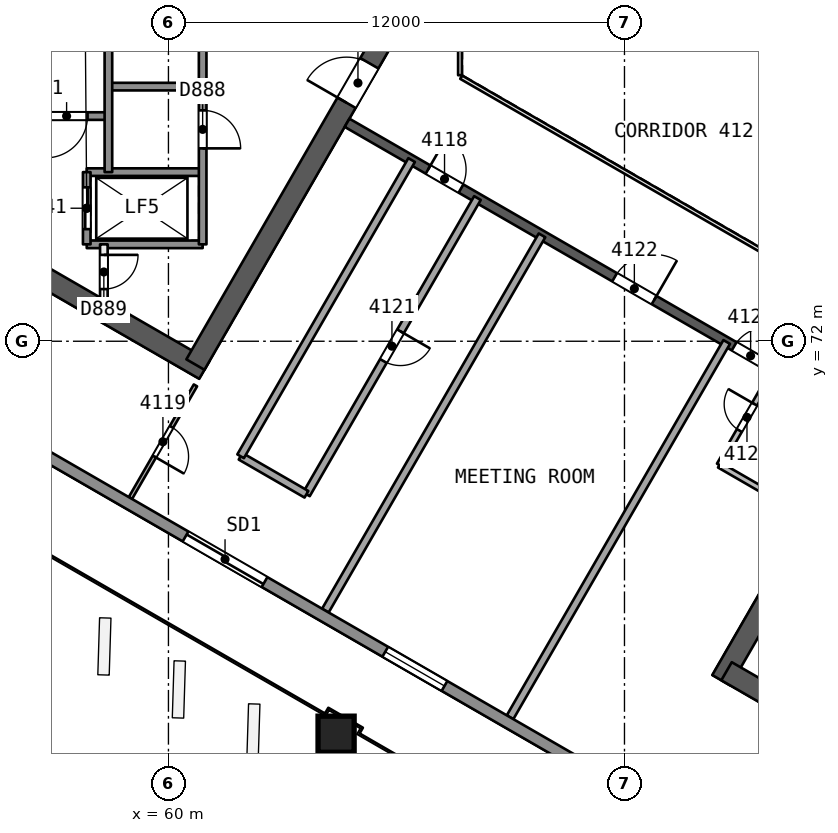
"""IFC4 building model, lengths in metres.
Left out: names, types, materials, properties, quantities, classifications, styles, units other than length and angle.
Written with IfcOpenShell. Run it as: python <this file> out.ifc"""

import sys

from ifc_helpers import new_model, si_unit, direction, frame, frame_2d, origin, origin_2d, place, context, subcontext, project, spatial, rectangle, extrude, element, fill, save


model = new_model("IFC4")
c1 = context("Model", 3, precision=1e-05, world=origin(), true_north=direction((0.0, 1.0)))
c2 = subcontext(c1, "Body", "Model", "MODEL_VIEW")
j1 = project(units=[si_unit("LENGTHUNIT", "METRE"), si_unit("PLANEANGLEUNIT", "RADIAN")], contexts=[c1])
p1 = place(None, origin())
s1 = spatial("IfcSite", under=j1, at=p1, CompositionType="ELEMENT")
p2 = place(p1, origin())
s2 = spatial("IfcBuilding", under=s1, at=p2, CompositionType="ELEMENT")
p3 = place(p2, frame((0.0, 0.0, 171.1)))
s3 = spatial("IfcBuildingStorey", under=s2, at=p3, CompositionType="ELEMENT", Elevation=171.1)
p4 = place(p3, frame((48.672, 78.336, 0.0), z_axis=(0.0, 0.0, 1.0), x_axis=(0.866023530946, -0.500003243837, 0.0)))
e1 = element("IfcWall", 1, at=p4, inside=s3, PredefinedType="SHEAR", context=c2, shape_type="SweptSolid", body=[
    extrude(rectangle(XDim=14.175, YDim=0.55, at=frame_2d((7.087, 0.0))), origin(), (0.0, 0.0, 1.0), 3.7),
])
p5 = place(p3, frame((60.709, 71.386, 0.0), z_axis=(0.0, 0.0, 1.0), x_axis=(0.500015938302, 0.866016201606, 0.0)))
e2 = element("IfcWall", 2, at=p5, inside=s3, PredefinedType="SHEAR", context=c2, shape_type="SweptSolid", body=[
    extrude(rectangle(XDim=10.105, YDim=0.55, at=frame_2d((5.053, 0.0))), origin(), (0.0, 0.0, 1.0), 3.7),
])
p6 = place(p5, frame((7.955, 0.0, 0.0)))
e3 = element("IfcOpeningElement", 3, at=p6, cuts=e2, PredefinedType="OPENING", context=c2, shape_type="SweptSolid", body=[
    extrude(rectangle(XDim=1.2, YDim=2.1, at=frame_2d((0.6, 1.05))), frame((0.0, 0.286, 0.0), z_axis=(0.0, -1.0, 0.0), x_axis=(1.0, 0.0, 0.0)), (0.0, 0.0, 1.0), 0.571),
])
p7 = place(p3, frame((79.659, 71.931, 0.0), z_axis=(0.0, 0.0, 1.0), x_axis=(-0.500000202252, -0.866025287014, 0.0)))
e4 = element("IfcWall", 4, at=p7, inside=s3, PredefinedType="SHEAR", context=c2, shape_type="SweptSolid", body=[
    extrude(rectangle(XDim=10.221, YDim=0.55, at=frame_2d((5.111, 0.0))), origin(), (0.0, 0.0, 1.0), 3.7),
])
p8 = place(p7, frame((0.791, 0.0, 0.0)))
e5 = element("IfcOpeningElement", 5, at=p8, cuts=e4, PredefinedType="OPENING", context=c2, shape_type="SweptSolid", body=[
    extrude(rectangle(XDim=1.2, YDim=2.1, at=frame_2d((0.6, 1.05))), frame((0.0, 0.286, 0.0), z_axis=(0.0, -1.0, 0.0), x_axis=(1.0, 0.0, 0.0)), (0.0, 0.0, 1.0), 0.571),
])
p9 = place(p3, frame((74.686, 63.317, 0.0), z_axis=(0.0, 0.0, 1.0), x_axis=(0.866024505738, -0.500001555459, 0.0)))
e6 = element("IfcWall", 6, at=p9, inside=s3, PredefinedType="SHEAR", context=c2, shape_type="SweptSolid", body=[
    extrude(rectangle(XDim=14.059, YDim=0.55, at=frame_2d((7.029, 0.0))), origin(), (0.0, 0.0, 1.0), 3.7),
])
p10 = place(p3, frame((64.7, 77.748, 0.0), z_axis=(0.0, 0.0, 1.0), x_axis=(0.866026492143, -0.499998114903, 0.0)))
e7 = element("IfcWall", 7, at=p10, inside=s3, PredefinedType="SHEAR", context=c2, shape_type="SweptSolid", body=[
    extrude(rectangle(XDim=15.588, YDim=0.25, at=frame_2d((7.794, 0.0))), origin(), (0.0, 0.0, 1.0), 3.25),
])
p11 = place(p10, frame((2.462, 0.0, 0.0)))
e8 = element("IfcOpeningElement", 8, at=p11, cuts=e7, PredefinedType="OPENING", context=c2, shape_type="SweptSolid", body=[
    extrude(rectangle(XDim=1.0, YDim=2.1, at=frame_2d((0.5, 1.05))), frame((0.0, 0.135, 0.0), z_axis=(0.0, -1.0, 0.0), x_axis=(1.0, 0.0, 0.0)), (0.0, 0.0, 1.0), 0.271),
])
p12 = place(p10, frame((8.129, 0.0, 0.0)))
e9 = element("IfcOpeningElement", 9, at=p12, cuts=e7, PredefinedType="OPENING", context=c2, shape_type="SweptSolid", body=[
    extrude(rectangle(XDim=1.2, YDim=2.4, at=frame_2d((0.6, 1.2))), frame((0.0, 0.135, 0.0), z_axis=(0.0, -1.0, 0.0), x_axis=(1.0, 0.0, 0.0)), (0.0, 0.0, 1.0), 0.271),
])
p13 = place(p10, frame((11.762, 0.0, 0.0)))
e10 = element("IfcOpeningElement", 10, at=p13, cuts=e7, PredefinedType="OPENING", context=c2, shape_type="SweptSolid", body=[
    extrude(rectangle(XDim=1.0, YDim=2.1, at=frame_2d((0.5, 1.05))), frame((0.0, 0.135, 0.0), z_axis=(0.0, -1.0, 0.0), x_axis=(1.0, 0.0, 0.0)), (0.0, 0.0, 1.0), 0.271),
])
p14 = place(p3, frame((64.399, 61.639, 0.0), z_axis=(0.010093620709, 0.017482414954, 0.999796221231), x_axis=(-0.499907122366, -0.865843723195, 0.020187025824)))
e11 = element("IfcColumn", 11, at=p14, inside=s3, PredefinedType="COLUMN", context=c2, shape_type="SweptSolid", body=[
    extrude(rectangle(XDim=0.95, YDim=0.95, at=origin_2d()), origin(), (0.0, 0.0, 1.0), 3.701),
])
p15 = place(p3, frame((60.71, 70.838, 0.0), z_axis=(0.0, 0.0, 1.0), x_axis=(-0.499981725576, -0.866035954271, 0.0)))
e12 = element("IfcWall", 12, at=p15, inside=s3, PredefinedType="PARTITIONING", context=c2, shape_type="SweptSolid", body=[
    extrude(rectangle(XDim=3.424, YDim=0.1, at=frame_2d((1.712, 0.0))), origin(), (0.0, 0.0, 1.0), 3.25),
])
p16 = place(p15, frame((1.262, 0.0, 0.0)))
e13 = element("IfcOpeningElement", 13, at=p16, cuts=e12, PredefinedType="OPENING", context=c2, shape_type="SweptSolid", body=[
    extrude(rectangle(XDim=0.9, YDim=2.1, at=frame_2d((0.45, 1.05))), frame((0.0, 0.061, 0.0), z_axis=(0.0, -1.0, 0.0), x_axis=(1.0, 0.0, 0.0)), (0.0, 0.0, 1.0), 0.121),
])
p17 = place(p3, frame((68.131, 75.767, 0.0), z_axis=(0.0, 0.0, 1.0), x_axis=(-0.5000018851, -0.866024315419, 0.0)))
e14 = element("IfcWall", 14, at=p17, inside=s3, PredefinedType="PARTITIONING", context=c2, shape_type="SweptSolid", body=[
    extrude(rectangle(XDim=9.0, YDim=0.2, at=frame_2d((4.5, 0.0))), origin(), (0.0, 0.0, 1.0), 3.25),
])
p18 = place(p17, frame((4.05, 0.0, 0.0)))
e15 = element("IfcOpeningElement", 15, at=p18, cuts=e14, PredefinedType="OPENING", context=c2, shape_type="SweptSolid", body=[
    extrude(rectangle(XDim=0.9, YDim=2.1, at=frame_2d((0.45, 1.05))), frame((0.0, 0.11, 0.0), z_axis=(0.0, -1.0, 0.0), x_axis=(1.0, 0.0, 0.0)), (0.0, 0.0, 1.0), 0.221),
])
p19 = place(p3, frame((63.631, 67.973, 0.0), z_axis=(0.0, 0.0, 1.0), x_axis=(-0.866041268327, 0.499972520799, 0.0)))
e16 = element("IfcWall", 16, at=p19, inside=s3, PredefinedType="PARTITIONING", context=c2, shape_type="SweptSolid", body=[
    extrude(rectangle(XDim=2.0, YDim=0.2, at=frame_2d((1.0, 0.0))), origin(), (0.0, 0.0, 1.0), 3.25),
])
p20 = place(p3, frame((61.899, 68.973, 0.0), z_axis=(0.0, 0.0, 1.0), x_axis=(0.5000018851, 0.866024315419, 0.0)))
e17 = element("IfcWall", 17, at=p20, inside=s3, PredefinedType="PARTITIONING", context=c2, shape_type="SweptSolid", body=[
    extrude(rectangle(XDim=9.0, YDim=0.2, at=frame_2d((4.5, 0.0))), origin(), (0.0, 0.0, 1.0), 3.25),
])
for number, where, z_axis, x_axis in (
    (18, (64.129, 64.912, 0.0), (0.0, 0.0, 1.0), (0.5, 0.866, 0.0)),
    (19, (68.989, 62.106, 0.0), (0.0, 0.0, 1.0), (0.5, 0.866, 0.0)),
):
    element("IfcWall", number, at=place(p3, frame(where, z_axis=z_axis, x_axis=x_axis)), inside=s3, PredefinedType="PARTITIONING", context=c2, shape_type="SweptSolid", body=[
        extrude(rectangle(XDim=11.402, YDim=0.2, at=frame_2d((5.701, 0.0))), origin(), (0.0, 0.0, 1.0), 3.25),
    ])
p21 = place(p3, frame((76.578, 67.542, 0.0), z_axis=(0.0, 0.0, 1.0), x_axis=(-0.866038271014, 0.499977712642, 0.0)))
e20 = element("IfcWall", 20, at=p21, inside=s3, PredefinedType="PARTITIONING", context=c2, shape_type="SweptSolid", body=[
    extrude(rectangle(XDim=2.401, YDim=0.15, at=frame_2d((1.2, 0.0))), origin(), (0.0, 0.0, 1.0), 3.25),
])
p22 = place(p3, frame((74.498, 68.743, 0.0), z_axis=(0.0, 0.0, 1.0), x_axis=(0.499987231761, 0.866032775405, 0.0)))
e21 = element("IfcWall", 21, at=p22, inside=s3, PredefinedType="PARTITIONING", context=c2, shape_type="SweptSolid", body=[
    extrude(rectangle(XDim=2.9, YDim=0.15, at=frame_2d((1.45, 0.0))), origin(), (0.0, 0.0, 1.0), 3.25),
])
p23 = place(p22, frame((1.05, 0.0, 0.0)))
e22 = element("IfcOpeningElement", 22, at=p23, cuts=e21, PredefinedType="OPENING", context=c2, shape_type="SweptSolid", body=[
    extrude(rectangle(XDim=0.8, YDim=2.1, at=frame_2d((0.4, 1.05))), frame((0.0, 0.085, 0.0), z_axis=(0.0, -1.0, 0.0), x_axis=(1.0, 0.0, 0.0)), (0.0, 0.0, 1.0), 0.171),
])
p24 = place(p3, frame((88.899, 50.439, 0.0), z_axis=(0.0, 0.0, 1.0), x_axis=(-0.866024128163, 0.500002209434, 0.0)))
e23 = element("IfcWall", 23, at=p24, inside=s3, PredefinedType="SOLIDWALL", context=c2, shape_type="SweptSolid", body=[
    extrude(rectangle(XDim=53.635, YDim=0.3, at=frame_2d((26.817, 0.0))), origin(), (0.0, 0.0, 1.0), 3.25),
])
p25 = place(p24, frame((30.45, 0.0, 0.0)))
e24 = element("IfcOpeningElement", 24, at=p25, cuts=e23, PredefinedType="OPENING", context=c2, shape_type="SweptSolid", body=[
    extrude(rectangle(XDim=2.4, YDim=2.4, at=frame_2d((1.2, 1.2))), frame((0.0, 0.161, 0.0), z_axis=(0.0, -1.0, 0.0), x_axis=(1.0, 0.0, 0.0)), (0.0, 0.0, 1.0), 0.321),
])
p26 = place(p24, frame((41.683, 0.0, 0.0)))
e25 = element("IfcOpeningElement", 25, at=p26, cuts=e23, PredefinedType="OPENING", context=c2, shape_type="SweptSolid", body=[
    extrude(rectangle(XDim=2.4, YDim=2.4, at=frame_2d((1.2, 1.2))), frame((0.0, 0.161, 0.0), z_axis=(0.0, -1.0, 0.0), x_axis=(1.0, 0.0, 0.0)), (0.0, 0.0, 1.0), 0.321),
])
p27 = place(p24, frame((10.295, 0.0, 0.0)))
e26 = element("IfcOpeningElement", 26, at=p27, cuts=e23, PredefinedType="OPENING", context=c2, shape_type="SweptSolid", body=[
    extrude(rectangle(XDim=2.4, YDim=2.4, at=frame_2d((1.2, 1.2))), frame((0.0, 0.161, 0.0), z_axis=(0.0, -1.0, 0.0), x_axis=(1.0, 0.0, 0.0)), (0.0, 0.0, 1.0), 0.321),
])
p28 = place(p24, frame((24.982, 0.0, 0.9)))
e27 = element("IfcOpeningElement", 27, at=p28, cuts=e23, PredefinedType="OPENING", context=c2, shape_type="SweptSolid", body=[
    extrude(rectangle(XDim=1.8, YDim=1.5, at=frame_2d((0.9, 0.75))), frame((0.0, 0.161, 0.0), z_axis=(0.0, -1.0, 0.0), x_axis=(1.0, 0.0, 0.0)), (0.0, 0.0, 1.0), 0.321),
])
p29 = place(p3, frame((60.9, 78.7, 0.0), z_axis=(0.0, 0.0, 1.0), x_axis=(-1.0, 0.0, 0.0)))
e28 = element("IfcWall", 28, at=p29, inside=s3, PredefinedType="SOLIDWALL", context=c2, shape_type="SweptSolid", body=[
    extrude(rectangle(XDim=2.48, YDim=0.2, at=frame_2d((1.24, 0.0))), origin(), (0.0, 0.0, 1.0), 3.25),
])
p30 = place(p3, frame((58.42, 77.925, 0.0), z_axis=(0.0, 0.0, 1.0), x_axis=(-1.0, 0.0, 0.0)))
e29 = element("IfcWall", 29, at=p30, inside=s3, PredefinedType="SOLIDWALL", context=c2, shape_type="SweptSolid", body=[
    extrude(rectangle(XDim=7.7, YDim=0.2, at=frame_2d((3.85, 0.0))), origin(), (0.0, 0.0, 1.0), 3.25),
])
p31 = place(p30, frame((0.55, 0.0, 0.0)))
e30 = element("IfcOpeningElement", 30, at=p31, cuts=e29, PredefinedType="OPENING", context=c2, shape_type="SweptSolid", body=[
    extrude(rectangle(XDim=1.1, YDim=2.1, at=frame_2d((0.55, 1.05))), frame((0.0, 0.11, 0.0), z_axis=(0.0, -1.0, 0.0), x_axis=(1.0, 0.0, 0.0)), (0.0, 0.0, 1.0), 0.221),
])
for number, where, z_axis, x_axis in (
    (31, (60.9, 76.45, 0.0), (0.0, 0.0, 1.0), (-1.0, 0.0, 0.0)),
    (32, (60.9, 74.55, 0.0), (0.0, 0.0, 1.0), (-1.0, 0.0, 0.0)),
):
    element("IfcWall", number, at=place(p3, frame(where, z_axis=z_axis, x_axis=x_axis)), inside=s3, PredefinedType="SOLIDWALL", context=c2, shape_type="SweptSolid", body=[
        extrude(rectangle(XDim=3.05, YDim=0.2, at=frame_2d((1.525, 0.0))), origin(), (0.0, 0.0, 1.0), 3.25),
    ])
p32 = place(p3, frame((60.9, 85.45, 0.0), z_axis=(0.0, 0.0, 1.0), x_axis=(0.0, -1.0, 0.0)))
e33 = element("IfcWall", 33, at=p32, inside=s3, PredefinedType="SOLIDWALL", context=c2, shape_type="SweptSolid", body=[
    extrude(rectangle(XDim=10.9, YDim=0.2, at=frame_2d((5.45, 0.0))), origin(), (0.0, 0.0, 1.0), 3.25),
])
p33 = place(p32, frame((2.875, 0.0, 0.0)))
e34 = element("IfcOpeningElement", 34, at=p33, cuts=e33, PredefinedType="OPENING", context=c2, shape_type="SweptSolid", body=[
    extrude(rectangle(XDim=1.0, YDim=2.1, at=frame_2d((0.5, 1.05))), frame((0.0, 0.11, 0.0), z_axis=(0.0, -1.0, 0.0), x_axis=(1.0, 0.0, 0.0)), (0.0, 0.0, 1.0), 0.221),
])
p34 = place(p32, frame((7.375, 0.0, 0.0)))
e35 = element("IfcOpeningElement", 35, at=p34, cuts=e33, PredefinedType="OPENING", context=c2, shape_type="SweptSolid", body=[
    extrude(rectangle(XDim=1.0, YDim=2.1, at=frame_2d((0.5, 1.05))), frame((0.0, 0.11, 0.0), z_axis=(0.0, -1.0, 0.0), x_axis=(1.0, 0.0, 0.0)), (0.0, 0.0, 1.0), 0.221),
])
p35 = place(p3, frame((58.42, 86.974, 0.0), z_axis=(0.0, 0.0, 1.0), x_axis=(0.0, -1.0, 0.0)))
e36 = element("IfcWall", 36, at=p35, inside=s3, PredefinedType="SOLIDWALL", context=c2, shape_type="SweptSolid", body=[
    extrude(rectangle(XDim=10.524, YDim=0.2, at=frame_2d((5.262, 0.0))), origin(), (0.0, 0.0, 1.0), 3.25),
])
p36 = place(p35, frame((0.312, 0.0, 0.0)))
e37 = element("IfcOpeningElement", 37, at=p36, cuts=e36, PredefinedType="OPENING", context=c2, shape_type="SweptSolid", body=[
    extrude(rectangle(XDim=0.9, YDim=2.1, at=frame_2d((0.45, 1.05))), frame((0.0, 0.11, 0.0), z_axis=(0.0, -1.0, 0.0), x_axis=(1.0, 0.0, 0.0)), (0.0, 0.0, 1.0), 0.221),
])
p37 = place(p3, frame((58.3, 74.55, 0.0), z_axis=(0.0, 0.0, 1.0), x_axis=(0.0, -1.0, 0.0)))
e38 = element("IfcWall", 38, at=p37, inside=s3, PredefinedType="PARTITIONING", context=c2, shape_type="SweptSolid", body=[
    extrude(rectangle(XDim=1.455, YDim=0.2, at=frame_2d((0.728, 0.0))), origin(), (0.0, 0.0, 1.0), 3.25),
])
p38 = place(p37, frame((0.278, 0.0, 0.0)))
e39 = element("IfcOpeningElement", 39, at=p38, cuts=e38, PredefinedType="OPENING", context=c2, shape_type="SweptSolid", body=[
    extrude(rectangle(XDim=0.9, YDim=2.1, at=frame_2d((0.45, 1.05))), frame((0.0, 0.11, 0.0), z_axis=(0.0, -1.0, 0.0), x_axis=(1.0, 0.0, 0.0)), (0.0, 0.0, 1.0), 0.221),
])
p39 = place(p3, frame((57.85, 76.45, 0.0), z_axis=(0.0, 0.0, 1.0), x_axis=(0.0, -1.0, 0.0)))
e40 = element("IfcWall", 40, at=p39, inside=s3, PredefinedType="SOLIDWALL", context=c2, shape_type="SweptSolid", body=[
    extrude(rectangle(XDim=1.9, YDim=0.2, at=frame_2d((0.95, 0.0))), origin(), (0.0, 0.0, 1.0), 3.25),
])
p40 = place(p39, frame((0.4, 0.0, 0.0)))
e41 = element("IfcOpeningElement", 41, at=p40, cuts=e40, PredefinedType="OPENING", context=c2, shape_type="SweptSolid", body=[
    extrude(rectangle(XDim=1.1, YDim=2.1, at=frame_2d((0.55, 1.05))), frame((0.0, 0.11, 0.0), z_axis=(0.0, -1.0, 0.0), x_axis=(1.0, 0.0, 0.0)), (0.0, 0.0, 1.0), 0.221),
])
p41 = place(p3, frame((67.672, 81.0, 0.0), z_axis=(0.0, 0.0, 1.0), x_axis=(0.0, -1.0, 0.0)))
e42 = element("IfcWall", 42, at=p41, inside=s3, PredefinedType="PARTITIONING", context=c2, shape_type="SweptSolid", body=[
    extrude(rectangle(XDim=2.0, YDim=0.1, at=frame_2d((1.0, 0.0))), origin(), (0.0, 0.0, 1.0), 3.25),
])
p42 = place(p3, frame((67.702, 78.948, 0.0), z_axis=(0.0, 0.0, 1.0), x_axis=(0.866026658274, -0.499997827154, 0.0)))
e43 = element("IfcWall", 43, at=p42, inside=s3, PredefinedType="PARTITIONING", context=c2, shape_type="SweptSolid", body=[
    extrude(rectangle(XDim=11.588, YDim=0.1, at=frame_2d((5.794, 0.0))), origin(), (0.0, 0.0, 1.0), 3.25),
])
p43 = place(p11, origin())
e44 = element("IfcDoor", 44, at=p43, inside=s3, OperationType="SINGLE_SWING_LEFT", PredefinedType="NOTDEFINED", context=c2, shape_type="SweptSolid", body=[
    extrude(rectangle(XDim=1.0, YDim=2.1, at=frame_2d((0.5, 1.05))), frame((0.0, 0.025, 0.0), z_axis=(0.0, -1.0, 0.0), x_axis=(1.0, 0.0, 0.0)), (0.0, 0.0, 1.0), 0.05),
])
fill(e8, e44)
p44 = place(p16, origin())
e45 = element("IfcDoor", 45, at=p44, inside=s3, OperationType="SINGLE_SWING_RIGHT", PredefinedType="NOTDEFINED", context=c2, shape_type="SweptSolid", body=[
    extrude(rectangle(XDim=0.9, YDim=2.1, at=frame_2d((0.45, 1.05))), frame((0.0, 0.025, 0.0), z_axis=(0.0, -1.0, 0.0), x_axis=(1.0, 0.0, 0.0)), (0.0, 0.0, 1.0), 0.05),
])
fill(e13, e45)
p45 = place(p18, origin())
e46 = element("IfcDoor", 46, at=p45, inside=s3, OperationType="SINGLE_SWING_LEFT", PredefinedType="NOTDEFINED", context=c2, shape_type="SweptSolid", body=[
    extrude(rectangle(XDim=0.9, YDim=2.1, at=frame_2d((0.45, 1.05))), frame((0.0, 0.025, 0.0), z_axis=(0.0, -1.0, 0.0), x_axis=(1.0, 0.0, 0.0)), (0.0, 0.0, 1.0), 0.05),
])
fill(e15, e46)
p46 = place(p12, origin())
e47 = element("IfcDoor", 47, at=p46, inside=s3, OperationType="SINGLE_SWING_RIGHT", PredefinedType="NOTDEFINED", context=c2, shape_type="SweptSolid", body=[
    extrude(rectangle(XDim=1.2, YDim=2.4, at=frame_2d((0.6, 1.2))), frame((0.0, 0.025, 0.0), z_axis=(0.0, -1.0, 0.0), x_axis=(1.0, 0.0, 0.0)), (0.0, 0.0, 1.0), 0.05),
])
fill(e9, e47)
p47 = place(p23, origin())
e48 = element("IfcDoor", 48, at=p47, inside=s3, OperationType="SINGLE_SWING_RIGHT", PredefinedType="NOTDEFINED", context=c2, shape_type="SweptSolid", body=[
    extrude(rectangle(XDim=0.8, YDim=2.1, at=frame_2d((0.4, 1.05))), frame((0.0, 0.025, 0.0), z_axis=(0.0, -1.0, 0.0), x_axis=(1.0, 0.0, 0.0)), (0.0, 0.0, 1.0), 0.05),
])
fill(e22, e48)
p48 = place(p13, origin())
e49 = element("IfcDoor", 49, at=p48, inside=s3, OperationType="SINGLE_SWING_RIGHT", PredefinedType="NOTDEFINED", context=c2, shape_type="SweptSolid", body=[
    extrude(rectangle(XDim=1.0, YDim=2.1, at=frame_2d((0.5, 1.05))), frame((0.0, 0.025, 0.0), z_axis=(0.0, -1.0, 0.0), x_axis=(1.0, 0.0, 0.0)), (0.0, 0.0, 1.0), 0.05),
])
fill(e10, e49)
p49 = place(p25, origin())
e50 = element("IfcDoor", 50, at=p49, inside=s3, OperationType="SLIDING_TO_LEFT", PredefinedType="NOTDEFINED", context=c2, shape_type="SweptSolid", body=[
    extrude(rectangle(XDim=2.4, YDim=2.4, at=frame_2d((1.2, 1.2))), frame((0.0, 0.025, 0.0), z_axis=(0.0, -1.0, 0.0), x_axis=(1.0, 0.0, 0.0)), (0.0, 0.0, 1.0), 0.05),
])
fill(e24, e50)
p50 = place(p28, origin())
e51 = element("IfcWindow", 51, at=p50, inside=s3, PartitioningType="SINGLE_PANEL", PredefinedType="WINDOW", context=c2, shape_type="SweptSolid", body=[
    extrude(rectangle(XDim=1.8, YDim=1.5, at=frame_2d((0.9, 0.75))), frame((0.0, 0.03, 0.0), z_axis=(0.0, -1.0, 0.0), x_axis=(1.0, 0.0, 0.0)), (0.0, 0.0, 1.0), 0.06),
])
fill(e27, e51)
p51 = place(p6, origin())
e52 = element("IfcDoor", 52, at=p51, inside=s3, OperationType="SINGLE_SWING_LEFT", PredefinedType="NOTDEFINED", context=c2, shape_type="SweptSolid", body=[
    extrude(rectangle(XDim=1.2, YDim=2.1, at=frame_2d((0.6, 1.05))), frame((0.0, 0.025, 0.0), z_axis=(0.0, -1.0, 0.0), x_axis=(1.0, 0.0, 0.0)), (0.0, 0.0, 1.0), 0.05),
])
fill(e3, e52)
p52 = place(p40, origin())
e53 = element("IfcDoor", 53, at=p52, inside=s3, OperationType="SLIDING_TO_RIGHT", PredefinedType="NOTDEFINED", context=c2, shape_type="SweptSolid", body=[
    extrude(rectangle(XDim=1.1, YDim=2.1, at=frame_2d((0.55, 1.05))), frame((0.0, 0.025, 0.0), z_axis=(0.0, -1.0, 0.0), x_axis=(1.0, 0.0, 0.0)), (0.0, 0.0, 1.0), 0.05),
])
fill(e41, e53)
p53 = place(p34, origin())
e54 = element("IfcDoor", 54, at=p53, inside=s3, OperationType="SINGLE_SWING_RIGHT", PredefinedType="NOTDEFINED", context=c2, shape_type="SweptSolid", body=[
    extrude(rectangle(XDim=1.0, YDim=2.1, at=frame_2d((0.5, 1.05))), frame((0.0, 0.025, 0.0), z_axis=(0.0, -1.0, 0.0), x_axis=(1.0, 0.0, 0.0)), (0.0, 0.0, 1.0), 0.05),
])
fill(e35, e54)
p54 = place(p38, origin())
e55 = element("IfcDoor", 55, at=p54, inside=s3, OperationType="SINGLE_SWING_LEFT", PredefinedType="NOTDEFINED", context=c2, shape_type="SweptSolid", body=[
    extrude(rectangle(XDim=0.9, YDim=2.1, at=frame_2d((0.45, 1.05))), frame((0.0, 0.025, 0.0), z_axis=(0.0, -1.0, 0.0), x_axis=(1.0, 0.0, 0.0)), (0.0, 0.0, 1.0), 0.05),
])
fill(e39, e55)
p55 = place(p31, origin())
e56 = element("IfcDoor", 56, at=p55, inside=s3, OperationType="SINGLE_SWING_RIGHT", PredefinedType="NOTDEFINED", context=c2, shape_type="SweptSolid", body=[
    extrude(rectangle(XDim=1.1, YDim=2.1, at=frame_2d((0.55, 1.05))), frame((0.0, 0.025, 0.0), z_axis=(0.0, -1.0, 0.0), x_axis=(1.0, 0.0, 0.0)), (0.0, 0.0, 1.0), 0.05),
])
fill(e30, e56)
save(model, sys.argv[1])
